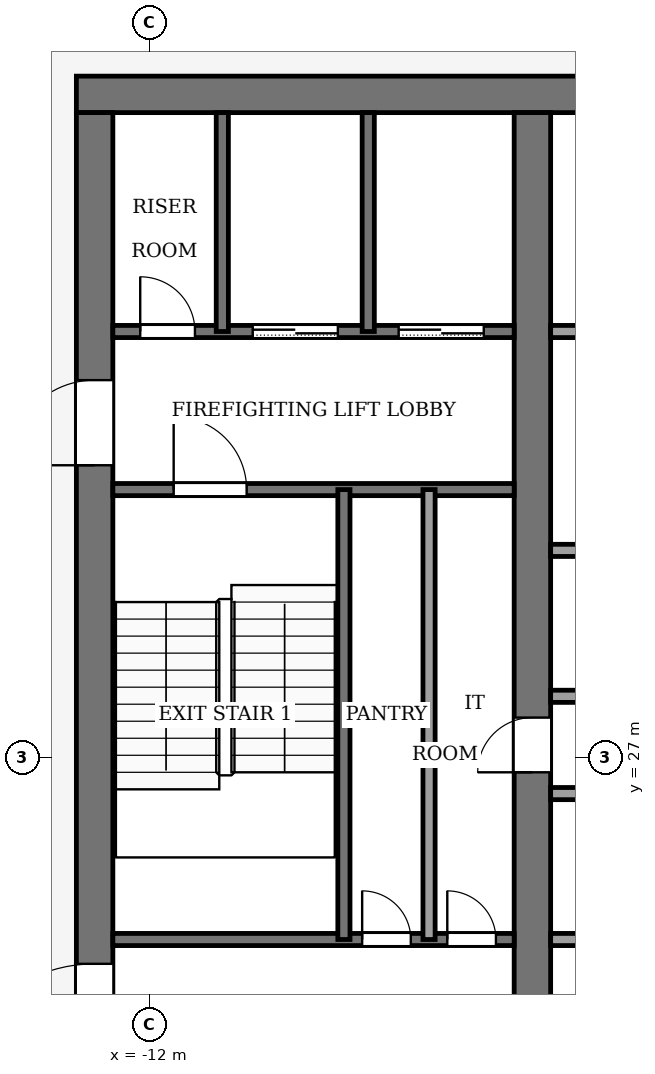
"""IFC4 building model, lengths in metres.
Left out: names, types, materials, properties, quantities, classifications, styles, units other than length and angle.
Written with IfcOpenShell. Run it as: python <this file> out.ifc"""

import sys

from ifc_helpers import new_model, si_unit, direction, frame, frame_2d, origin, place, context, subcontext, project, spatial, rectangle, extrude, element, fill, save


model = new_model("IFC4")
c1 = context("Model", 3, precision=1e-05, world=origin(), true_north=direction((0.0, 1.0)))
c2 = subcontext(c1, "Body", "Model", "MODEL_VIEW")
j1 = project(units=[si_unit("LENGTHUNIT", "METRE"), si_unit("PLANEANGLEUNIT", "RADIAN")], contexts=[c1])
p1 = place(None, origin())
s1 = spatial("IfcSite", under=j1, at=p1, CompositionType="ELEMENT")
p2 = place(p1, origin())
s2 = spatial("IfcBuilding", under=s1, at=p2, CompositionType="ELEMENT")
p3 = place(p2, frame((0.0, 0.0, 318.0)))
s3 = spatial("IfcBuildingStorey", under=s2, at=p3, CompositionType="ELEMENT", Elevation=318.0)
p4 = place(p3, frame((-13.2, 37.9, -0.13), z_axis=(0.0, 0.0, 1.0), x_axis=(1.0, 0.0, 0.0)))
e1 = element("IfcWall", 1, at=p4, inside=s3, PredefinedType="SHEAR", context=c2, shape_type="SweptSolid", body=[
    extrude(rectangle(XDim=26.4, YDim=0.6, at=frame_2d((13.2, 0.0))), origin(), (0.0, 0.0, 1.0), 4.0),
])
p5 = place(p3, frame((-12.9, 18.4, -0.13), z_axis=(0.0, 0.0, 1.0), x_axis=(0.0, 1.0, 0.0)))
e2 = element("IfcWall", 2, at=p5, inside=s3, PredefinedType="SHEAR", context=c2, shape_type="SweptSolid", body=[
    extrude(rectangle(XDim=19.2, YDim=0.6, at=frame_2d((9.6, 0.0))), origin(), (0.0, 0.0, 1.0), 4.0),
])
p6 = place(p5, frame((2.8, 0.0, 0.13)))
e3 = element("IfcOpeningElement", 3, at=p6, cuts=e2, PredefinedType="OPENING", context=c2, shape_type="SweptSolid", body=[
    extrude(rectangle(XDim=2.4, YDim=2.4, at=frame_2d((1.2, 1.2))), frame((0.0, 0.31, 0.0), z_axis=(0.0, -1.0, 0.0), x_axis=(1.0, 0.0, 0.0)), (0.0, 0.0, 1.0), 0.62),
])
p7 = place(p5, frame((13.4, 0.0, 0.13)))
e4 = element("IfcOpeningElement", 4, at=p7, cuts=e2, PredefinedType="OPENING", context=c2, shape_type="SweptSolid", body=[
    extrude(rectangle(XDim=1.4, YDim=2.2, at=frame_2d((0.7, 1.1))), frame((0.0, 0.31, 0.0), z_axis=(0.0, -1.0, 0.0), x_axis=(1.0, 0.0, 0.0)), (0.0, 0.0, 1.0), 0.62),
])
p8 = place(p3, frame((-5.7, 18.4, -0.13), z_axis=(0.0, 0.0, 1.0), x_axis=(0.0, 1.0, 0.0)))
e5 = element("IfcWall", 5, at=p8, inside=s3, PredefinedType="SHEAR", context=c2, shape_type="SweptSolid", body=[
    extrude(rectangle(XDim=19.2, YDim=0.6, at=frame_2d((9.6, 0.0))), origin(), (0.0, 0.0, 1.0), 4.0),
])
p9 = place(p8, frame((8.35, 0.0, 0.13)))
e6 = element("IfcOpeningElement", 6, at=p9, cuts=e5, PredefinedType="OPENING", context=c2, shape_type="SweptSolid", body=[
    extrude(rectangle(XDim=0.9, YDim=2.1, at=frame_2d((0.45, 1.05))), frame((0.0, 0.31, 0.0), z_axis=(0.0, -1.0, 0.0), x_axis=(1.0, 0.0, 0.0)), (0.0, 0.0, 1.0), 0.62),
])
p10 = place(p3, frame((-12.6, 24.0, 0.0), z_axis=(0.0, 0.0, 1.0), x_axis=(1.0, 0.0, 0.0)))
e7 = element("IfcWall", 7, at=p10, inside=s3, PredefinedType="PARTITIONING", context=c2, shape_type="SweptSolid", body=[
    extrude(rectangle(XDim=6.6, YDim=0.2, at=frame_2d((3.3, 0.0))), origin(), (0.0, 0.0, 1.0), 3.87),
])
p11 = place(p10, frame((4.1, 0.0, 0.0)))
e8 = element("IfcOpeningElement", 8, at=p11, cuts=e7, PredefinedType="OPENING", context=c2, shape_type="SweptSolid", body=[
    extrude(rectangle(XDim=0.8, YDim=2.1, at=frame_2d((0.4, 1.05))), frame((0.0, 0.11, 0.0), z_axis=(0.0, -1.0, 0.0), x_axis=(1.0, 0.0, 0.0)), (0.0, 0.0, 1.0), 0.22),
])
p12 = place(p10, frame((5.5, 0.0, 0.0)))
e9 = element("IfcOpeningElement", 9, at=p12, cuts=e7, PredefinedType="OPENING", context=c2, shape_type="SweptSolid", body=[
    extrude(rectangle(XDim=0.8, YDim=2.1, at=frame_2d((0.4, 1.05))), frame((0.0, 0.11, 0.0), z_axis=(0.0, -1.0, 0.0), x_axis=(1.0, 0.0, 0.0)), (0.0, 0.0, 1.0), 0.22),
])
p13 = place(p3, frame((-5.4, 24.0, 0.0), z_axis=(0.0, 0.0, 1.0), x_axis=(1.0, 0.0, 0.0)))
e10 = element("IfcWall", 10, at=p13, inside=s3, PredefinedType="PARTITIONING", context=c2, shape_type="SweptSolid", body=[
    extrude(rectangle(XDim=10.8, YDim=0.2, at=frame_2d((5.4, 0.0))), origin(), (0.0, 0.0, 1.0), 3.87),
])
p14 = place(p13, frame((1.552, 0.0, 0.0)))
e11 = element("IfcOpeningElement", 11, at=p14, cuts=e10, PredefinedType="OPENING", context=c2, shape_type="SweptSolid", body=[
    extrude(rectangle(XDim=1.0, YDim=2.1, at=frame_2d((0.5, 1.05))), frame((0.0, 0.11, 0.0), z_axis=(0.0, -1.0, 0.0), x_axis=(1.0, 0.0, 0.0)), (0.0, 0.0, 1.0), 0.22),
])
p15 = place(p13, frame((6.952, 0.0, 0.0)))
e12 = element("IfcOpeningElement", 12, at=p15, cuts=e10, PredefinedType="OPENING", context=c2, shape_type="SweptSolid", body=[
    extrude(rectangle(XDim=1.0, YDim=2.1, at=frame_2d((0.5, 1.05))), frame((0.0, 0.11, 0.0), z_axis=(0.0, -1.0, 0.0), x_axis=(1.0, 0.0, 0.0)), (0.0, 0.0, 1.0), 0.22),
])
for number, where, z_axis, x_axis in (
    (13, (-5.4, 26.4, 0.0), (0.0, 0.0, 1.0), (1.0, 0.0, 0.0)),
    (14, (-5.4, 28.0, 0.0), (0.0, 0.0, 1.0), (1.0, 0.0, 0.0)),
):
    element("IfcWall", number, at=place(p3, frame(where, z_axis=z_axis, x_axis=x_axis)), inside=s3, PredefinedType="PARTITIONING", context=c2, shape_type="SweptSolid", body=[
        extrude(rectangle(XDim=10.8, YDim=0.2, at=frame_2d((5.4, 0.0))), origin(), (0.0, 0.0, 1.0), 3.87),
    ])
p16 = place(p3, frame((-5.4, 30.4, 0.0), z_axis=(0.0, 0.0, 1.0), x_axis=(1.0, 0.0, 0.0)))
e15 = element("IfcWall", 15, at=p16, inside=s3, PredefinedType="PARTITIONING", context=c2, shape_type="SweptSolid", body=[
    extrude(rectangle(XDim=10.8, YDim=0.2, at=frame_2d((5.4, 0.0))), origin(), (0.0, 0.0, 1.0), 3.87),
])
p17 = place(p16, frame((2.47, 0.0, 0.0)))
e16 = element("IfcOpeningElement", 16, at=p17, cuts=e15, PredefinedType="OPENING", context=c2, shape_type="SweptSolid", body=[
    extrude(rectangle(XDim=1.0, YDim=2.1, at=frame_2d((0.5, 1.05))), frame((0.0, 0.11, 0.0), z_axis=(0.0, -1.0, 0.0), x_axis=(1.0, 0.0, 0.0)), (0.0, 0.0, 1.0), 0.22),
])
p18 = place(p16, frame((7.87, 0.0, 0.0)))
e17 = element("IfcOpeningElement", 17, at=p18, cuts=e15, PredefinedType="OPENING", context=c2, shape_type="SweptSolid", body=[
    extrude(rectangle(XDim=1.0, YDim=2.1, at=frame_2d((0.5, 1.05))), frame((0.0, 0.11, 0.0), z_axis=(0.0, -1.0, 0.0), x_axis=(1.0, 0.0, 0.0)), (0.0, 0.0, 1.0), 0.22),
])
p19 = place(p3, frame((-12.6, 31.4, 0.0), z_axis=(0.0, 0.0, 1.0), x_axis=(1.0, 0.0, 0.0)))
e18 = element("IfcWall", 18, at=p19, inside=s3, PredefinedType="PARTITIONING", context=c2, shape_type="SweptSolid", body=[
    extrude(rectangle(XDim=6.6, YDim=0.2, at=frame_2d((3.3, 0.0))), origin(), (0.0, 0.0, 1.0), 3.87),
])
p20 = place(p19, frame((1.0, 0.0, 0.0)))
e19 = element("IfcOpeningElement", 19, at=p20, cuts=e18, PredefinedType="OPENING", context=c2, shape_type="SweptSolid", body=[
    extrude(rectangle(XDim=1.2, YDim=2.2, at=frame_2d((0.6, 1.1))), frame((0.0, 0.11, 0.0), z_axis=(0.0, -1.0, 0.0), x_axis=(1.0, 0.0, 0.0)), (0.0, 0.0, 1.0), 0.22),
])
p21 = place(p3, frame((-12.6, 34.0, 0.0), z_axis=(0.0, 0.0, 1.0), x_axis=(1.0, 0.0, 0.0)))
e20 = element("IfcWall", 20, at=p21, inside=s3, PredefinedType="PARTITIONING", context=c2, shape_type="SweptSolid", body=[
    extrude(rectangle(XDim=6.6, YDim=0.2, at=frame_2d((3.3, 0.0))), origin(), (0.0, 0.0, 1.0), 3.87),
])
p22 = place(p21, frame((4.7, 0.0, 0.0)))
e21 = element("IfcOpeningElement", 21, at=p22, cuts=e20, PredefinedType="OPENING", context=c2, shape_type="SweptSolid", body=[
    extrude(rectangle(XDim=1.4, YDim=2.2, at=frame_2d((0.7, 1.1))), frame((0.0, 0.11, 0.0), z_axis=(0.0, -1.0, 0.0), x_axis=(1.0, 0.0, 0.0)), (0.0, 0.0, 1.0), 0.22),
])
p23 = place(p21, frame((2.3, 0.0, 0.0)))
e22 = element("IfcOpeningElement", 22, at=p23, cuts=e20, PredefinedType="OPENING", context=c2, shape_type="SweptSolid", body=[
    extrude(rectangle(XDim=1.4, YDim=2.2, at=frame_2d((0.7, 1.1))), frame((0.0, 0.11, 0.0), z_axis=(0.0, -1.0, 0.0), x_axis=(1.0, 0.0, 0.0)), (0.0, 0.0, 1.0), 0.22),
])
p24 = place(p21, frame((0.45, 0.0, 0.0)))
e23 = element("IfcOpeningElement", 23, at=p24, cuts=e20, PredefinedType="OPENING", context=c2, shape_type="SweptSolid", body=[
    extrude(rectangle(XDim=0.9, YDim=2.1, at=frame_2d((0.45, 1.05))), frame((0.0, 0.11, 0.0), z_axis=(0.0, -1.0, 0.0), x_axis=(1.0, 0.0, 0.0)), (0.0, 0.0, 1.0), 0.22),
])
p25 = place(p3, frame((-5.4, 34.0, 0.0), z_axis=(0.0, 0.0, 1.0), x_axis=(1.0, 0.0, 0.0)))
e24 = element("IfcWall", 24, at=p25, inside=s3, PredefinedType="PARTITIONING", context=c2, shape_type="SweptSolid", body=[
    extrude(rectangle(XDim=10.8, YDim=0.2, at=frame_2d((5.4, 0.0))), origin(), (0.0, 0.0, 1.0), 3.87),
])
p26 = place(p25, frame((6.15, 0.0, 0.0)))
e25 = element("IfcOpeningElement", 25, at=p26, cuts=e24, PredefinedType="OPENING", context=c2, shape_type="SweptSolid", body=[
    extrude(rectangle(XDim=1.2, YDim=2.2, at=frame_2d((0.6, 1.1))), frame((0.0, 0.11, 0.0), z_axis=(0.0, -1.0, 0.0), x_axis=(1.0, 0.0, 0.0)), (0.0, 0.0, 1.0), 0.22),
])
p27 = place(p25, frame((8.95, 0.0, 0.0)))
e26 = element("IfcOpeningElement", 26, at=p27, cuts=e24, PredefinedType="OPENING", context=c2, shape_type="SweptSolid", body=[
    extrude(rectangle(XDim=1.0, YDim=2.1, at=frame_2d((0.5, 1.05))), frame((0.0, 0.11, 0.0), z_axis=(0.0, -1.0, 0.0), x_axis=(1.0, 0.0, 0.0)), (0.0, 0.0, 1.0), 0.22),
])
p28 = place(p3, frame((-10.8, 34.0, 0.0), z_axis=(0.0, 0.0, 1.0), x_axis=(0.0, 1.0, 0.0)))
e27 = element("IfcWall", 27, at=p28, inside=s3, PredefinedType="PARTITIONING", context=c2, shape_type="SweptSolid", body=[
    extrude(rectangle(XDim=3.6, YDim=0.2, at=frame_2d((1.8, 0.0))), origin(), (0.0, 0.0, 1.0), 3.87),
])
p29 = place(p3, frame((-8.8, 24.0, 0.0), z_axis=(0.0, 0.0, 1.0), x_axis=(0.0, 1.0, 0.0)))
e28 = element("IfcWall", 28, at=p29, inside=s3, PredefinedType="PARTITIONING", context=c2, shape_type="SweptSolid", body=[
    extrude(rectangle(XDim=7.4, YDim=0.2, at=frame_2d((3.7, 0.0))), origin(), (0.0, 0.0, 1.0), 3.87),
])
p30 = place(p3, frame((-8.4, 34.0, 0.0), z_axis=(0.0, 0.0, 1.0), x_axis=(0.0, 1.0, 0.0)))
e29 = element("IfcWall", 29, at=p30, inside=s3, PredefinedType="PARTITIONING", context=c2, shape_type="SweptSolid", body=[
    extrude(rectangle(XDim=3.6, YDim=0.2, at=frame_2d((1.8, 0.0))), origin(), (0.0, 0.0, 1.0), 3.87),
])
p31 = place(p3, frame((-7.4, 24.0, 0.0), z_axis=(0.0, 0.0, 1.0), x_axis=(0.0, 1.0, 0.0)))
e30 = element("IfcWall", 30, at=p31, inside=s3, PredefinedType="PARTITIONING", context=c2, shape_type="SweptSolid", body=[
    extrude(rectangle(XDim=7.4, YDim=0.2, at=frame_2d((3.7, 0.0))), origin(), (0.0, 0.0, 1.0), 3.87),
])
p32 = place(p22, origin())
e31 = element("IfcDoor", 31, at=p32, inside=s3, OperationType="SLIDING_TO_LEFT", PredefinedType="DOOR", context=c2, shape_type="SweptSolid", body=[
    extrude(rectangle(XDim=1.4, YDim=2.2, at=frame_2d((0.7, 1.1))), frame((0.0, 0.025, 0.0), z_axis=(0.0, -1.0, 0.0), x_axis=(1.0, 0.0, 0.0)), (0.0, 0.0, 1.0), 0.05),
])
fill(e21, e31)
p33 = place(p23, origin())
e32 = element("IfcDoor", 32, at=p33, inside=s3, OperationType="SLIDING_TO_LEFT", PredefinedType="DOOR", context=c2, shape_type="SweptSolid", body=[
    extrude(rectangle(XDim=1.4, YDim=2.2, at=frame_2d((0.7, 1.1))), frame((0.0, 0.025, 0.0), z_axis=(0.0, -1.0, 0.0), x_axis=(1.0, 0.0, 0.0)), (0.0, 0.0, 1.0), 0.05),
])
fill(e22, e32)
p34 = place(p24, origin())
e33 = element("IfcDoor", 33, at=p34, inside=s3, OperationType="SINGLE_SWING_RIGHT", PredefinedType="DOOR", context=c2, shape_type="SweptSolid", body=[
    extrude(rectangle(XDim=0.9, YDim=2.1, at=frame_2d((0.45, 1.05))), frame((0.0, 0.025, 0.0), z_axis=(0.0, -1.0, 0.0), x_axis=(1.0, 0.0, 0.0)), (0.0, 0.0, 1.0), 0.05),
])
fill(e23, e33)
p35 = place(p11, origin())
e34 = element("IfcDoor", 34, at=p35, inside=s3, OperationType="SINGLE_SWING_LEFT", PredefinedType="DOOR", context=c2, shape_type="SweptSolid", body=[
    extrude(rectangle(XDim=0.8, YDim=2.1, at=frame_2d((0.4, 1.05))), frame((0.0, 0.025, 0.0), z_axis=(0.0, -1.0, 0.0), x_axis=(1.0, 0.0, 0.0)), (0.0, 0.0, 1.0), 0.05),
])
fill(e8, e34)
p36 = place(p12, origin())
e35 = element("IfcDoor", 35, at=p36, inside=s3, OperationType="SINGLE_SWING_RIGHT", PredefinedType="DOOR", context=c2, shape_type="SweptSolid", body=[
    extrude(rectangle(XDim=0.8, YDim=2.1, at=frame_2d((0.4, 1.05))), frame((0.0, 0.025, 0.0), z_axis=(0.0, -1.0, 0.0), x_axis=(1.0, 0.0, 0.0)), (0.0, 0.0, 1.0), 0.05),
])
fill(e9, e35)
p37 = place(p9, origin())
e36 = element("IfcDoor", 36, at=p37, inside=s3, OperationType="SINGLE_SWING_LEFT", PredefinedType="DOOR", context=c2, shape_type="SweptSolid", body=[
    extrude(rectangle(XDim=0.9, YDim=2.1, at=frame_2d((0.45, 1.05))), frame((0.0, 0.025, 0.0), z_axis=(0.0, -1.0, 0.0), x_axis=(1.0, 0.0, 0.0)), (0.0, 0.0, 1.0), 0.05),
])
fill(e6, e36)
p38 = place(p20, origin())
e37 = element("IfcDoor", 37, at=p38, inside=s3, OperationType="SINGLE_SWING_RIGHT", PredefinedType="DOOR", context=c2, shape_type="SweptSolid", body=[
    extrude(rectangle(XDim=1.2, YDim=2.2, at=frame_2d((0.6, 1.1))), frame((0.0, 0.025, 0.0), z_axis=(0.0, -1.0, 0.0), x_axis=(1.0, 0.0, 0.0)), (0.0, 0.0, 1.0), 0.05),
])
fill(e19, e37)
p39 = place(p6, origin())
e38 = element("IfcDoor", 38, at=p39, inside=s3, OperationType="DOUBLE_DOOR_SINGLE_SWING", PredefinedType="DOOR", context=c2, shape_type="SweptSolid", body=[
    extrude(rectangle(XDim=2.4, YDim=2.4, at=frame_2d((1.2, 1.2))), frame((0.0, 0.025, 0.0), z_axis=(0.0, -1.0, 0.0), x_axis=(1.0, 0.0, 0.0)), (0.0, 0.0, 1.0), 0.05),
])
fill(e3, e38)
p40 = place(p7, origin())
e39 = element("IfcDoor", 39, at=p40, inside=s3, OperationType="SINGLE_SWING_RIGHT", PredefinedType="DOOR", context=c2, shape_type="SweptSolid", body=[
    extrude(rectangle(XDim=1.4, YDim=2.2, at=frame_2d((0.7, 1.1))), frame((0.0, 0.025, 0.0), z_axis=(0.0, -1.0, 0.0), x_axis=(1.0, 0.0, 0.0)), (0.0, 0.0, 1.0), 0.05),
])
fill(e4, e39)
save(model, sys.argv[1])
